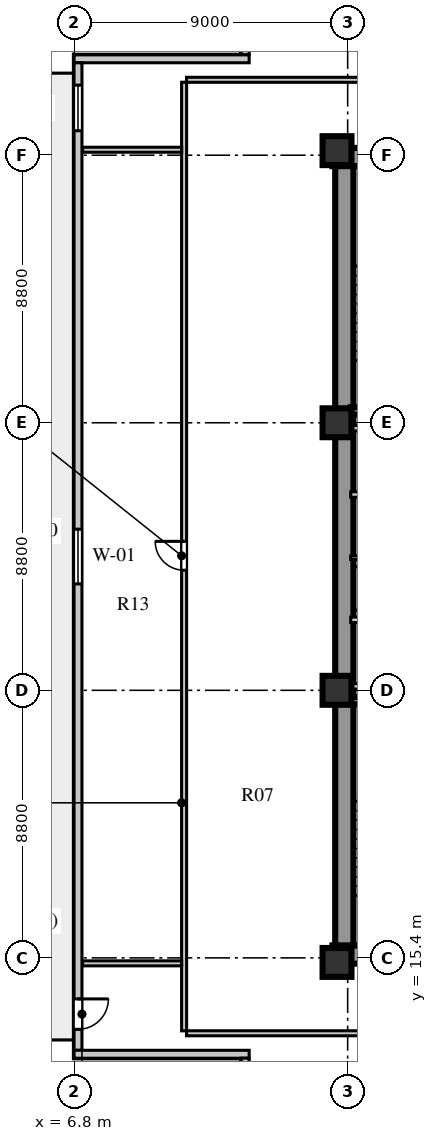
"""IFC4 building model, lengths in metres.
Left out: names, types, materials, properties, quantities, classifications, styles, units other than length and angle.
Written with IfcOpenShell. Run it as: python <this file> out.ifc"""

import sys

from ifc_helpers import new_model, si_unit, direction, frame, frame_2d, origin, origin_2d, place, context, subcontext, project, spatial, rectangle, extrude, element, fill, save


model = new_model("IFC4")
c1 = context("Model", 3, precision=1e-05, world=origin(), true_north=direction((0.0, 1.0)))
c2 = subcontext(c1, "Body", "Model", "MODEL_VIEW")
j1 = project(units=[si_unit("LENGTHUNIT", "METRE"), si_unit("PLANEANGLEUNIT", "RADIAN")], contexts=[c1])
p1 = place(None, origin())
s1 = spatial("IfcSite", under=j1, at=p1, CompositionType="ELEMENT")
p2 = place(p1, origin())
s2 = spatial("IfcBuilding", under=s1, at=p2, CompositionType="ELEMENT")
p3 = place(p2, frame((0.0, 0.0, 66.0)))
s3 = spatial("IfcBuildingStorey", under=s2, at=p3, CompositionType="ELEMENT", Elevation=66.0)
for number, where, z_axis, x_axis in (
    (1, (15.3, 15.51, 0.0), (0.0, 0.0, 1.0), (1.0, 0.0, 0.0)),
    (2, (15.3, 41.74, 0.0), (0.0, 0.0, 1.0), (1.0, 0.0, 0.0)),
):
    element("IfcWall", number, at=place(p3, frame(where, z_axis=z_axis, x_axis=x_axis)), inside=s3, PredefinedType="SHEAR", context=c2, shape_type="SweptSolid", body=[
        extrude(rectangle(XDim=9.88, YDim=0.6, at=frame_2d((4.94, 0.0))), origin(), (0.0, 0.0, 1.0), 3.72),
    ])
p4 = place(p3, frame((15.69, 15.81, 0.0), z_axis=(0.0, 0.0, 1.0), x_axis=(0.0, 1.0, 0.0)))
e3 = element("IfcWall", 3, at=p4, inside=s3, PredefinedType="SHEAR", context=c2, shape_type="SweptSolid", body=[
    extrude(rectangle(XDim=25.63, YDim=0.6, at=frame_2d((12.815, 0.0))), origin(), (0.0, 0.0, 1.0), 3.72),
])
for number, where, z_axis, x_axis in (
    (4, (15.45, 15.25, 0.0), (0.0, 0.0, 1.0), (1.0, 0.0, 0.0)),
    (5, (15.45, 24.2, 0.0), (0.0, 0.0, 1.0), (1.0, 0.0, 0.0)),
    (6, (15.45, 33.0, 0.0), (0.0, 0.0, 1.0), (1.0, 0.0, 0.0)),
    (7, (15.45, 41.95, 0.0), (0.0, 0.0, 1.0), (1.0, 0.0, 0.0)),
):
    element("IfcColumn", number, at=place(p3, frame(where, z_axis=z_axis, x_axis=x_axis)), inside=s3, PredefinedType="COLUMN", context=c2, shape_type="SweptSolid", body=[
        extrude(rectangle(XDim=0.95, YDim=0.95, at=origin_2d()), origin(), (0.0, 0.0, 1.0), 3.72),
    ])
p5 = place(p3, frame((12.43, 50.34, 0.0), z_axis=(0.0, 0.0, 1.0), x_axis=(0.0, -1.0, 0.0)))
e8 = element("IfcWall", 8, at=p5, inside=s3, PredefinedType="SOLIDWALL", context=c2, shape_type="SweptSolid", body=[
    extrude(rectangle(XDim=5.24, YDim=0.26, at=frame_2d((2.62, 0.0))), origin(), (0.0, 0.0, 1.0), 3.72),
])
p6 = place(p3, frame((12.56, 44.97, 0.0), z_axis=(0.0, 0.0, 1.0), x_axis=(-1.0, 0.0, 0.0)))
e9 = element("IfcWall", 9, at=p6, inside=s3, PredefinedType="SOLIDWALL", context=c2, shape_type="SweptSolid", body=[
    extrude(rectangle(XDim=5.76, YDim=0.26, at=frame_2d((2.88, 0.0))), origin(), (0.0, 0.0, 1.0), 3.72),
])
p7 = place(p3, frame((6.93, 44.84, 0.0), z_axis=(0.0, 0.0, 1.0), x_axis=(0.0, -1.0, 0.0)))
e10 = element("IfcWall", 10, at=p7, inside=s3, PredefinedType="SOLIDWALL", context=c2, shape_type="SweptSolid", body=[
    extrude(rectangle(XDim=32.48, YDim=0.26, at=frame_2d((16.24, 0.0))), origin(), (0.0, 0.0, 1.0), 3.72),
])
p8 = place(p7, frame((30.79, 0.0, 0.0)))
e11 = element("IfcOpeningElement", 11, at=p8, cuts=e10, PredefinedType="OPENING", context=c2, shape_type="SweptSolid", body=[
    extrude(rectangle(XDim=1.0, YDim=2.05, at=frame_2d((0.5, 1.025))), frame((0.0, 0.14, 0.0), z_axis=(0.0, -1.0, 0.0), x_axis=(1.0, 0.0, 0.0)), (0.0, 0.0, 1.0), 0.28),
])
p9 = place(p7, frame((15.34, 0.0, 0.8)))
e12 = element("IfcOpeningElement", 12, at=p9, cuts=e10, PredefinedType="OPENING", context=c2, shape_type="SweptSolid", body=[
    extrude(rectangle(XDim=1.8, YDim=2.0, at=frame_2d((0.9, 1.0))), frame((0.0, 0.14, 0.0), z_axis=(0.0, -1.0, 0.0), x_axis=(1.0, 0.0, 0.0)), (0.0, 0.0, 1.0), 0.28),
])
p10 = place(p7, frame((0.735, 0.0, 0.8)))
e13 = element("IfcOpeningElement", 13, at=p10, cuts=e10, PredefinedType="OPENING", context=c2, shape_type="SweptSolid", body=[
    extrude(rectangle(XDim=1.5, YDim=2.0, at=frame_2d((0.75, 1.0))), frame((0.0, 0.14, 0.0), z_axis=(0.0, -1.0, 0.0), x_axis=(1.0, 0.0, 0.0)), (0.0, 0.0, 1.0), 0.28),
])
p11 = place(p3, frame((6.8, 12.23, 0.0), z_axis=(0.0, 0.0, 1.0), x_axis=(1.0, 0.0, 0.0)))
e14 = element("IfcWall", 14, at=p11, inside=s3, PredefinedType="SOLIDWALL", context=c2, shape_type="SweptSolid", body=[
    extrude(rectangle(XDim=5.76, YDim=0.26, at=frame_2d((2.88, 0.0))), origin(), (0.0, 0.0, 1.0), 3.72),
])
p12 = place(p3, frame((12.43, 12.1, 0.0), z_axis=(0.0, 0.0, 1.0), x_axis=(0.0, -1.0, 0.0)))
e15 = element("IfcWall", 15, at=p12, inside=s3, PredefinedType="SOLIDWALL", context=c2, shape_type="SweptSolid", body=[
    extrude(rectangle(XDim=5.24, YDim=0.26, at=frame_2d((2.62, 0.0))), origin(), (0.0, 0.0, 1.0), 3.72),
])
p13 = place(p3, frame((15.9, 23.86, 0.0), z_axis=(0.0, 0.0, 1.0), x_axis=(1.0, 0.0, 0.0)))
e16 = element("IfcWall", 16, at=p13, inside=s3, PredefinedType="SHEAR", context=c2, shape_type="SweptSolid", body=[
    extrude(rectangle(XDim=3.52, YDim=0.24, at=frame_2d((1.76, 0.0))), origin(), (0.0, 0.0, 1.0), 4.0),
])
p14 = place(p3, frame((15.9, 26.52, 0.0), z_axis=(0.0, 0.0, 1.0), x_axis=(1.0, 0.0, 0.0)))
e17 = element("IfcWall", 17, at=p14, inside=s3, PredefinedType="SOLIDWALL", context=c2, shape_type="SweptSolid", body=[
    extrude(rectangle(XDim=8.68, YDim=0.18, at=frame_2d((4.34, 0.0))), origin(), (0.0, 0.0, 1.0), 3.72),
])
p15 = place(p14, frame((1.76, 0.0, 0.0)))
e18 = element("IfcOpeningElement", 18, at=p15, cuts=e17, PredefinedType="OPENING", context=c2, shape_type="SweptSolid", body=[
    extrude(rectangle(XDim=1.0, YDim=2.1, at=frame_2d((0.5, 1.05))), frame((0.0, 0.1, 0.0), z_axis=(0.0, -1.0, 0.0), x_axis=(1.0, 0.0, 0.0)), (0.0, 0.0, 1.0), 0.2),
])
p16 = place(p14, frame((3.6, 0.0, 0.0)))
e19 = element("IfcOpeningElement", 19, at=p16, cuts=e17, PredefinedType="OPENING", context=c2, shape_type="SweptSolid", body=[
    extrude(rectangle(XDim=1.0, YDim=2.1, at=frame_2d((0.5, 1.05))), frame((0.0, 0.1, 0.0), z_axis=(0.0, -1.0, 0.0), x_axis=(1.0, 0.0, 0.0)), (0.0, 0.0, 1.0), 0.2),
])
p17 = place(p14, frame((5.44, 0.0, 0.0)))
e20 = element("IfcOpeningElement", 20, at=p17, cuts=e17, PredefinedType="OPENING", context=c2, shape_type="SweptSolid", body=[
    extrude(rectangle(XDim=1.0, YDim=2.1, at=frame_2d((0.5, 1.05))), frame((0.0, 0.1, 0.0), z_axis=(0.0, -1.0, 0.0), x_axis=(1.0, 0.0, 0.0)), (0.0, 0.0, 1.0), 0.2),
])
p18 = place(p14, frame((7.28, 0.0, 0.0)))
e21 = element("IfcOpeningElement", 21, at=p18, cuts=e17, PredefinedType="OPENING", context=c2, shape_type="SweptSolid", body=[
    extrude(rectangle(XDim=1.0, YDim=2.1, at=frame_2d((0.5, 1.05))), frame((0.0, 0.1, 0.0), z_axis=(0.0, -1.0, 0.0), x_axis=(1.0, 0.0, 0.0)), (0.0, 0.0, 1.0), 0.2),
])
p19 = place(p3, frame((15.9, 24.33, 0.0), z_axis=(0.0, 0.0, 1.0), x_axis=(1.0, 0.0, 0.0)))
e22 = element("IfcWall", 22, at=p19, inside=s3, PredefinedType="SOLIDWALL", context=c2, shape_type="SweptSolid", body=[
    extrude(rectangle(XDim=8.68, YDim=0.18, at=frame_2d((4.34, 0.0))), origin(), (0.0, 0.0, 1.0), 3.02),
])
p20 = place(p3, frame((15.9, 28.56, 0.0), z_axis=(0.0, 0.0, 1.0), x_axis=(1.0, 0.0, 0.0)))
e23 = element("IfcWall", 23, at=p20, inside=s3, PredefinedType="PARTITIONING", context=c2, shape_type="SweptSolid", body=[
    extrude(rectangle(XDim=1.2, YDim=0.12, at=frame_2d((0.6, 0.0))), origin(), (0.0, 0.0, 1.0), 3.72),
])
p21 = place(p3, frame((15.9, 30.64, 0.0), z_axis=(0.0, 0.0, 1.0), x_axis=(1.0, 0.0, 0.0)))
e24 = element("IfcWall", 24, at=p21, inside=s3, PredefinedType="SOLIDWALL", context=c2, shape_type="SweptSolid", body=[
    extrude(rectangle(XDim=8.68, YDim=0.18, at=frame_2d((4.34, 0.0))), origin(), (0.0, 0.0, 1.0), 3.72),
])
p22 = place(p21, frame((1.76, 0.0, 0.0)))
e25 = element("IfcOpeningElement", 25, at=p22, cuts=e24, PredefinedType="OPENING", context=c2, shape_type="SweptSolid", body=[
    extrude(rectangle(XDim=1.0, YDim=2.1, at=frame_2d((0.5, 1.05))), frame((0.0, 0.1, 0.0), z_axis=(0.0, -1.0, 0.0), x_axis=(1.0, 0.0, 0.0)), (0.0, 0.0, 1.0), 0.2),
])
p23 = place(p21, frame((3.6, 0.0, 0.0)))
e26 = element("IfcOpeningElement", 26, at=p23, cuts=e24, PredefinedType="OPENING", context=c2, shape_type="SweptSolid", body=[
    extrude(rectangle(XDim=1.0, YDim=2.1, at=frame_2d((0.5, 1.05))), frame((0.0, 0.1, 0.0), z_axis=(0.0, -1.0, 0.0), x_axis=(1.0, 0.0, 0.0)), (0.0, 0.0, 1.0), 0.2),
])
p24 = place(p21, frame((5.44, 0.0, 0.0)))
e27 = element("IfcOpeningElement", 27, at=p24, cuts=e24, PredefinedType="OPENING", context=c2, shape_type="SweptSolid", body=[
    extrude(rectangle(XDim=1.0, YDim=2.1, at=frame_2d((0.5, 1.05))), frame((0.0, 0.1, 0.0), z_axis=(0.0, -1.0, 0.0), x_axis=(1.0, 0.0, 0.0)), (0.0, 0.0, 1.0), 0.2),
])
p25 = place(p21, frame((7.28, 0.0, 0.0)))
e28 = element("IfcOpeningElement", 28, at=p25, cuts=e24, PredefinedType="OPENING", context=c2, shape_type="SweptSolid", body=[
    extrude(rectangle(XDim=1.0, YDim=2.1, at=frame_2d((0.5, 1.05))), frame((0.0, 0.1, 0.0), z_axis=(0.0, -1.0, 0.0), x_axis=(1.0, 0.0, 0.0)), (0.0, 0.0, 1.0), 0.2),
])
p26 = place(p3, frame((15.9, 32.82, 0.0), z_axis=(0.0, 0.0, 1.0), x_axis=(1.0, 0.0, 0.0)))
e29 = element("IfcWall", 29, at=p26, inside=s3, PredefinedType="SOLIDWALL", context=c2, shape_type="SweptSolid", body=[
    extrude(rectangle(XDim=8.68, YDim=0.18, at=frame_2d((4.34, 0.0))), origin(), (0.0, 0.0, 1.0), 3.02),
])
p27 = place(p3, frame((15.9, 33.39, 0.0), z_axis=(0.0, 0.0, 1.0), x_axis=(1.0, 0.0, 0.0)))
e30 = element("IfcWall", 30, at=p27, inside=s3, PredefinedType="SHEAR", context=c2, shape_type="SweptSolid", body=[
    extrude(rectangle(XDim=3.52, YDim=0.24, at=frame_2d((1.76, 0.0))), origin(), (0.0, 0.0, 1.0), 4.0),
])
p28 = place(p3, frame((10.42, 13.0, 0.0), z_axis=(0.0, 0.0, 1.0), x_axis=(0.0, 1.0, 0.0)))
e31 = element("IfcWall", 31, at=p28, inside=s3, PredefinedType="PARTITIONING", context=c2, shape_type="SweptSolid", body=[
    extrude(rectangle(XDim=31.2, YDim=0.165, at=frame_2d((15.6, 0.0))), origin(), (0.0, 0.0, 1.0), 3.72),
])
p29 = place(p28, frame((15.15, 0.0, 0.0)))
e32 = element("IfcOpeningElement", 32, at=p29, cuts=e31, PredefinedType="OPENING", context=c2, shape_type="SweptSolid", body=[
    extrude(rectangle(XDim=0.95, YDim=2.08, at=frame_2d((0.475, 1.04))), frame((0.0, 0.093, 0.0), z_axis=(0.0, -1.0, 0.0), x_axis=(1.0, 0.0, 0.0)), (0.0, 0.0, 1.0), 0.185),
])
for number, where, z_axis, x_axis in (
    (33, (7.08, 15.22, 0.0), (0.0, 0.0, 1.0), (1.0, 0.0, 0.0)),
    (34, (7.08, 41.98, 0.0), (0.0, 0.0, 1.0), (1.0, 0.0, 0.0)),
):
    element("IfcWall", number, at=place(p3, frame(where, z_axis=z_axis, x_axis=x_axis)), inside=s3, PredefinedType="PARTITIONING", context=c2, shape_type="SweptSolid", body=[
        extrude(rectangle(XDim=3.26, YDim=0.165, at=frame_2d((1.63, 0.0))), origin(), (0.0, 0.0, 1.0), 3.22),
    ])
p30 = place(p3, frame((10.5, 12.92, 0.0), z_axis=(0.0, 0.0, 1.0), x_axis=(1.0, 0.0, 0.0)))
e35 = element("IfcWall", 35, at=p30, inside=s3, PredefinedType="PARTITIONING", context=c2, shape_type="SweptSolid", body=[
    extrude(rectangle(XDim=14.7, YDim=0.165, at=frame_2d((7.35, 0.0))), origin(), (0.0, 0.0, 1.0), 3.72),
])
p31 = place(p30, frame((6.2, 0.0, 0.0)))
e36 = element("IfcOpeningElement", 36, at=p31, cuts=e35, PredefinedType="OPENING", context=c2, shape_type="SweptSolid", body=[
    extrude(rectangle(XDim=1.0, YDim=2.08, at=frame_2d((0.5, 1.04))), frame((0.0, 0.093, 0.0), z_axis=(0.0, -1.0, 0.0), x_axis=(1.0, 0.0, 0.0)), (0.0, 0.0, 1.0), 0.185),
])
p32 = place(p3, frame((10.5, 44.28, 0.0), z_axis=(0.0, 0.0, 1.0), x_axis=(1.0, 0.0, 0.0)))
e37 = element("IfcWall", 37, at=p32, inside=s3, PredefinedType="PARTITIONING", context=c2, shape_type="SweptSolid", body=[
    extrude(rectangle(XDim=14.7, YDim=0.165, at=frame_2d((7.35, 0.0))), origin(), (0.0, 0.0, 1.0), 3.72),
])
p33 = place(p32, frame((6.2, 0.0, 0.0)))
e38 = element("IfcOpeningElement", 38, at=p33, cuts=e37, PredefinedType="OPENING", context=c2, shape_type="SweptSolid", body=[
    extrude(rectangle(XDim=1.0, YDim=2.08, at=frame_2d((0.5, 1.04))), frame((0.0, 0.093, 0.0), z_axis=(0.0, -1.0, 0.0), x_axis=(1.0, 0.0, 0.0)), (0.0, 0.0, 1.0), 0.185),
])
p34 = place(p8, frame((1.0, 0.0, 0.0), z_axis=(0.0, 0.0, 1.0), x_axis=(-1.0, 0.0, 0.0)))
e39 = element("IfcDoor", 39, at=p34, inside=s3, OperationType="SINGLE_SWING_RIGHT", PredefinedType="DOOR", context=c2, shape_type="SweptSolid", body=[
    extrude(rectangle(XDim=1.0, YDim=2.05, at=frame_2d((0.5, 1.025))), frame((0.0, 0.025, 0.0), z_axis=(0.0, -1.0, 0.0), x_axis=(1.0, 0.0, 0.0)), (0.0, 0.0, 1.0), 0.05),
])
fill(e11, e39)
p35 = place(p9, origin())
e40 = element("IfcWindow", 40, at=p35, inside=s3, PartitioningType="SINGLE_PANEL", PredefinedType="WINDOW", context=c2, shape_type="SweptSolid", body=[
    extrude(rectangle(XDim=1.8, YDim=2.0, at=frame_2d((0.9, 1.0))), frame((0.0, 0.03, 0.0), z_axis=(0.0, -1.0, 0.0), x_axis=(1.0, 0.0, 0.0)), (0.0, 0.0, 1.0), 0.06),
])
fill(e12, e40)
p36 = place(p10, origin())
e41 = element("IfcWindow", 41, at=p36, inside=s3, PartitioningType="SINGLE_PANEL", PredefinedType="WINDOW", context=c2, shape_type="SweptSolid", body=[
    extrude(rectangle(XDim=1.5, YDim=2.0, at=frame_2d((0.75, 1.0))), frame((0.0, 0.03, 0.0), z_axis=(0.0, -1.0, 0.0), x_axis=(1.0, 0.0, 0.0)), (0.0, 0.0, 1.0), 0.06),
])
fill(e13, e41)
p37 = place(p29, frame((0.95, 0.0, 0.0), z_axis=(0.0, 0.0, 1.0), x_axis=(-1.0, 0.0, 0.0)))
e42 = element("IfcDoor", 42, at=p37, inside=s3, OperationType="SINGLE_SWING_LEFT", PredefinedType="DOOR", context=c2, shape_type="SweptSolid", body=[
    extrude(rectangle(XDim=0.95, YDim=2.08, at=frame_2d((0.475, 1.04))), frame((0.0, 0.025, 0.0), z_axis=(0.0, -1.0, 0.0), x_axis=(1.0, 0.0, 0.0)), (0.0, 0.0, 1.0), 0.05),
])
fill(e32, e42)
save(model, sys.argv[1])
